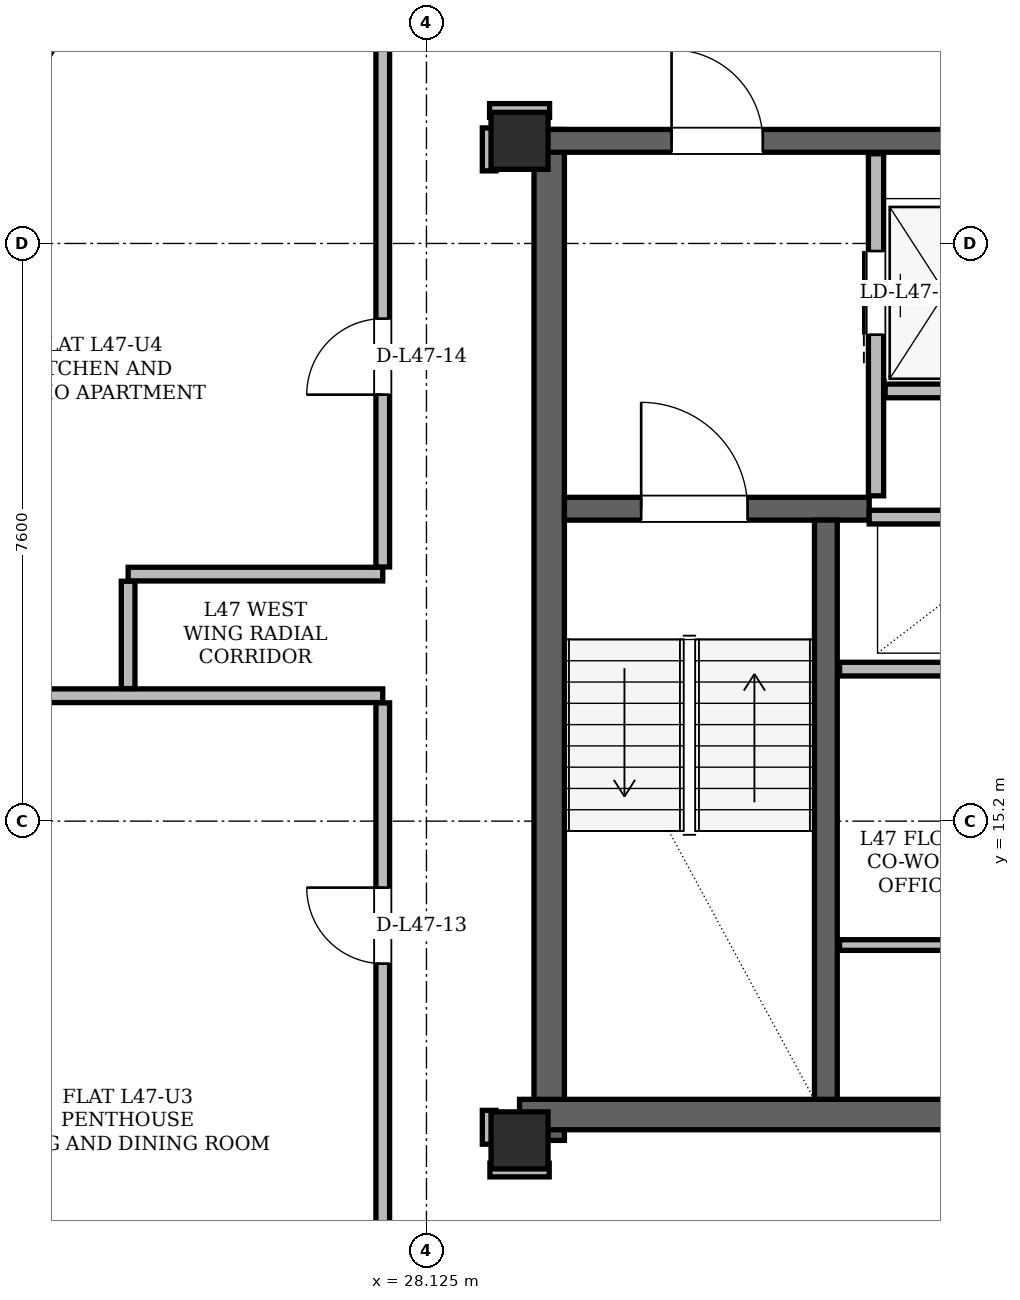
"""IFC4 building model, lengths in metres.
Left out: names, types, materials, properties, quantities, classifications, styles, units other than length and angle.
Written with IfcOpenShell. Run it as: python <this file> out.ifc"""

import sys

from ifc_helpers import new_model, si_unit, direction, frame, frame_2d, origin, origin_2d, place, context, subcontext, project, spatial, rectangle, hollow_rectangle, extrude, element, fill, save


model = new_model("IFC4")
c1 = context("Model", 3, precision=1e-05, world=origin(), true_north=direction((0.0, 1.0)))
c2 = subcontext(c1, "Body", "Model", "MODEL_VIEW")
j1 = project(units=[si_unit("LENGTHUNIT", "METRE"), si_unit("PLANEANGLEUNIT", "RADIAN")], contexts=[c1])
p1 = place(None, origin())
s1 = spatial("IfcSite", under=j1, at=p1, CompositionType="ELEMENT")
p2 = place(p1, origin())
s2 = spatial("IfcBuilding", under=s1, at=p2, CompositionType="ELEMENT")
p3 = place(p2, frame((0.0, 0.0, 178.2)))
s3 = spatial("IfcBuildingStorey", under=s2, at=p3, CompositionType="ELEMENT", Elevation=178.2)
for number, where, z_axis, x_axis in (
    (1, (29.35, 11.0, 0.0), (0.0, 0.0, 1.0), (1.0, 0.0, 0.0)),
    (2, (29.35, 24.15, 0.0), (0.0, 0.0, 1.0), (1.0, 0.0, 0.0)),
):
    element("IfcColumn", number, at=place(p3, frame(where, z_axis=z_axis, x_axis=x_axis)), inside=s3, PredefinedType="COLUMN", context=c2, shape_type="SweptSolid", body=[
        extrude(hollow_rectangle(XDim=0.75, YDim=0.75, WallThickness=0.06, at=origin_2d()), origin(), (0.0, 0.0, 1.0), 3.6),
    ])
p4 = place(p3, frame((29.74, 11.0, 0.0), z_axis=(0.0, 0.0, 1.0), x_axis=(0.0, 1.0, 0.0)))
e3 = element("IfcWall", 3, at=p4, inside=s3, PredefinedType="SHEAR", context=c2, shape_type="SweptSolid", body=[
    extrude(rectangle(XDim=13.3, YDim=0.4, at=frame_2d((6.65, 0.0))), origin(), (0.0, 0.0, 1.0), 3.38),
])
p5 = place(p3, frame((29.35, 11.34, 0.0), z_axis=(0.0, 0.0, 1.0), x_axis=(1.0, 0.0, 0.0)))
e4 = element("IfcWall", 4, at=p5, inside=s3, PredefinedType="SHEAR", context=c2, shape_type="SweptSolid", body=[
    extrude(rectangle(XDim=7.1, YDim=0.4, at=frame_2d((3.55, 0.0))), origin(), (0.0, 0.0, 1.0), 3.38),
])
p6 = place(p3, frame((29.65, 24.15, 0.0), z_axis=(0.0, 0.0, 1.0), x_axis=(1.0, 0.0, 0.0)))
e5 = element("IfcWall", 5, at=p6, inside=s3, PredefinedType="SHEAR", context=c2, shape_type="SweptSolid", body=[
    extrude(rectangle(XDim=15.7, YDim=0.3, at=frame_2d((7.85, 0.0))), origin(), (0.0, 0.0, 1.0), 3.38),
])
p7 = place(p6, frame((1.7, 0.0, 0.0)))
e6 = element("IfcOpeningElement", 6, at=p7, cuts=e5, PredefinedType="OPENING", context=c2, shape_type="SweptSolid", body=[
    extrude(rectangle(XDim=1.2, YDim=2.2, at=frame_2d((0.6, 1.1))), frame((0.0, 0.15, 0.0), z_axis=(0.0, -1.0, 0.0), x_axis=(1.0, 0.0, 0.0)), (0.0, 0.0, 1.0), 0.3),
])
p8 = place(p6, frame((12.8, 0.0, 0.0)))
e7 = element("IfcOpeningElement", 7, at=p8, cuts=e5, PredefinedType="OPENING", context=c2, shape_type="SweptSolid", body=[
    extrude(rectangle(XDim=1.2, YDim=2.2, at=frame_2d((0.6, 1.1))), frame((0.0, 0.15, 0.0), z_axis=(0.0, -1.0, 0.0), x_axis=(1.0, 0.0, 0.0)), (0.0, 0.0, 1.0), 0.3),
])
p9 = place(p6, frame((7.4, 0.0, 0.0)))
e8 = element("IfcOpeningElement", 8, at=p9, cuts=e5, PredefinedType="OPENING", context=c2, shape_type="SweptSolid", body=[
    extrude(rectangle(XDim=0.9, YDim=2.05, at=frame_2d((0.45, 1.025))), frame((0.0, 0.15, 0.0), z_axis=(0.0, -1.0, 0.0), x_axis=(1.0, 0.0, 0.0)), (0.0, 0.0, 1.0), 0.3),
])
p10 = place(p3, frame((29.94, 19.31, 0.0), z_axis=(0.0, 0.0, 1.0), x_axis=(1.0, 0.0, 0.0)))
e9 = element("IfcWall", 9, at=p10, inside=s3, PredefinedType="SHEAR", context=c2, shape_type="SweptSolid", body=[
    extrude(rectangle(XDim=4.01, YDim=0.3, at=frame_2d((2.005, 0.0))), origin(), (0.0, 0.0, 1.0), 3.38),
])
p11 = place(p10, frame((1.01, 0.0, 0.0)))
e10 = element("IfcOpeningElement", 10, at=p11, cuts=e9, PredefinedType="OPENING", context=c2, shape_type="SweptSolid", body=[
    extrude(rectangle(XDim=1.4, YDim=2.2, at=frame_2d((0.7, 1.1))), frame((0.0, 0.15, 0.0), z_axis=(0.0, -1.0, 0.0), x_axis=(1.0, 0.0, 0.0)), (0.0, 0.0, 1.0), 0.3),
])
p12 = place(p3, frame((33.38, 11.54, 0.0), z_axis=(0.0, 0.0, 1.0), x_axis=(0.0, 1.0, 0.0)))
e11 = element("IfcWall", 11, at=p12, inside=s3, PredefinedType="SHEAR", context=c2, shape_type="SweptSolid", body=[
    extrude(rectangle(XDim=7.62, YDim=0.3, at=frame_2d((3.81, 0.0))), origin(), (0.0, 0.0, 1.0), 3.38),
])
p13 = place(p3, frame((33.384, 43.257, 0.0), z_axis=(0.0, 0.0, 1.0), x_axis=(-0.499997641637, -0.866026765382, 0.0)))
e12 = element("IfcWall", 12, at=p13, inside=s3, PredefinedType="SOLIDWALL", context=c2, shape_type="SweptSolid", body=[
    extrude(rectangle(XDim=35.992, YDim=0.29, at=frame_2d((17.996, 0.0))), origin(), (0.0, 0.0, 1.0), 2.6),
])
p14 = place(p13, frame((8.034, 0.0, 0.0)))
e13 = element("IfcOpeningElement", 13, at=p14, cuts=e12, PredefinedType="OPENING", context=c2, shape_type="SweptSolid", body=[
    extrude(rectangle(XDim=1.5, YDim=2.2, at=frame_2d((0.75, 1.1))), frame((0.0, 0.145, 0.0), z_axis=(0.0, -1.0, 0.0), x_axis=(1.0, 0.0, 0.0)), (0.0, 0.0, 1.0), 0.29),
])
p15 = place(p13, frame((27.913, 0.0, 0.0)))
e14 = element("IfcOpeningElement", 14, at=p15, cuts=e12, PredefinedType="OPENING", context=c2, shape_type="SweptSolid", body=[
    extrude(rectangle(XDim=1.5, YDim=2.2, at=frame_2d((0.75, 1.1))), frame((0.0, 0.145, 0.0), z_axis=(0.0, -1.0, 0.0), x_axis=(1.0, 0.0, 0.0)), (0.0, 0.0, 1.0), 0.29),
])
p16 = place(p13, frame((33.875, 0.0, 0.85)))
e15 = element("IfcOpeningElement", 15, at=p16, cuts=e12, PredefinedType="OPENING", context=c2, shape_type="SweptSolid", body=[
    extrude(rectangle(XDim=1.2, YDim=1.48, at=frame_2d((0.6, 0.74))), frame((0.0, 0.145, 0.0), z_axis=(0.0, -1.0, 0.0), x_axis=(1.0, 0.0, 0.0)), (0.0, 0.0, 1.0), 0.29),
])
p17 = place(p13, frame((18.191, 0.0, 0.85)))
e16 = element("IfcOpeningElement", 16, at=p17, cuts=e12, PredefinedType="OPENING", context=c2, shape_type="SweptSolid", body=[
    extrude(rectangle(XDim=2.6, YDim=1.64, at=frame_2d((1.3, 0.82))), frame((0.0, 0.145, 0.0), z_axis=(0.0, -1.0, 0.0), x_axis=(1.0, 0.0, 0.0)), (0.0, 0.0, 1.0), 0.29),
])
p18 = place(p13, frame((26.178, 0.0, 0.85)))
e17 = element("IfcOpeningElement", 17, at=p18, cuts=e12, PredefinedType="OPENING", context=c2, shape_type="SweptSolid", body=[
    extrude(rectangle(XDim=1.2, YDim=1.48, at=frame_2d((0.6, 0.74))), frame((0.0, 0.145, 0.0), z_axis=(0.0, -1.0, 0.0), x_axis=(1.0, 0.0, 0.0)), (0.0, 0.0, 1.0), 0.29),
])
p19 = place(p13, frame((12.657, 0.0, 0.85)))
e18 = element("IfcOpeningElement", 18, at=p19, cuts=e12, PredefinedType="OPENING", context=c2, shape_type="SweptSolid", body=[
    extrude(rectangle(XDim=1.2, YDim=1.48, at=frame_2d((0.6, 0.74))), frame((0.0, 0.145, 0.0), z_axis=(0.0, -1.0, 0.0), x_axis=(1.0, 0.0, 0.0)), (0.0, 0.0, 1.0), 0.29),
])
p20 = place(p13, frame((14.939, 0.0, 0.85)))
e19 = element("IfcOpeningElement", 19, at=p20, cuts=e12, PredefinedType="OPENING", context=c2, shape_type="SweptSolid", body=[
    extrude(rectangle(XDim=1.8, YDim=1.64, at=frame_2d((0.9, 0.82))), frame((0.0, 0.145, 0.0), z_axis=(0.0, -1.0, 0.0), x_axis=(1.0, 0.0, 0.0)), (0.0, 0.0, 1.0), 0.29),
])
p21 = place(p13, frame((2.236, 0.0, 0.85)))
e20 = element("IfcOpeningElement", 20, at=p21, cuts=e12, PredefinedType="OPENING", context=c2, shape_type="SweptSolid", body=[
    extrude(rectangle(XDim=2.0, YDim=1.64, at=frame_2d((1.0, 0.82))), frame((0.0, 0.145, 0.0), z_axis=(0.0, -1.0, 0.0), x_axis=(1.0, 0.0, 0.0)), (0.0, 0.0, 1.0), 0.29),
])
p22 = place(p3, frame((34.04, 19.48, 0.0), z_axis=(0.0, 0.0, 1.0), x_axis=(0.0, 1.0, 0.0)))
e21 = element("IfcWall", 21, at=p22, inside=s3, PredefinedType="PARTITIONING", context=c2, shape_type="SweptSolid", body=[
    extrude(rectangle(XDim=4.5, YDim=0.2, at=frame_2d((2.25, 0.0))), origin(), (0.0, 0.0, 1.0), 3.38),
])
p23 = place(p22, frame((2.12, 0.0, 0.0)))
e22 = element("IfcOpeningElement", 22, at=p23, cuts=e21, PredefinedType="OPENING", context=c2, shape_type="SweptSolid", body=[
    extrude(rectangle(XDim=1.1, YDim=2.2, at=frame_2d((0.55, 1.1))), frame((0.0, 0.1, 0.0), z_axis=(0.0, -1.0, 0.0), x_axis=(1.0, 0.0, 0.0)), (0.0, 0.0, 1.0), 0.2),
])
p24 = place(p3, frame((34.16, 20.86, 0.0), z_axis=(0.0, 0.0, 1.0), x_axis=(1.0, 0.0, 0.0)))
e23 = element("IfcWall", 23, at=p24, inside=s3, PredefinedType="PARTITIONING", context=c2, shape_type="SweptSolid", body=[
    extrude(rectangle(XDim=1.58, YDim=0.18, at=frame_2d((0.79, 0.0))), origin(), (0.0, 0.0, 1.0), 3.38),
])
p25 = place(p3, frame((33.95, 19.2, 0.0), z_axis=(0.0, 0.0, 1.0), x_axis=(1.0, 0.0, 0.0)))
e24 = element("IfcWall", 24, at=p25, inside=s3, PredefinedType="PARTITIONING", context=c2, shape_type="SweptSolid", body=[
    extrude(rectangle(XDim=2.27, YDim=0.18, at=frame_2d((1.135, 0.0))), origin(), (0.0, 0.0, 1.0), 3.38),
])
p26 = place(p3, frame((33.56, 17.2, 0.0), z_axis=(0.0, 0.0, 1.0), x_axis=(1.0, 0.0, 0.0)))
e25 = element("IfcWall", 25, at=p26, inside=s3, PredefinedType="PARTITIONING", context=c2, shape_type="SweptSolid", body=[
    extrude(rectangle(XDim=2.66, YDim=0.18, at=frame_2d((1.33, 0.0))), origin(), (0.0, 0.0, 1.0), 3.38),
])
p27 = place(p3, frame((33.56, 13.57, 0.0), z_axis=(0.0, 0.0, 1.0), x_axis=(1.0, 0.0, 0.0)))
e26 = element("IfcWall", 26, at=p27, inside=s3, PredefinedType="PARTITIONING", context=c2, shape_type="SweptSolid", body=[
    extrude(rectangle(XDim=2.66, YDim=0.14, at=frame_2d((1.33, 0.0))), origin(), (0.0, 0.0, 1.0), 3.38),
])
p28 = place(p3, frame((28.96, 10.61, 0.0), z_axis=(0.0, 0.0, 1.0), x_axis=(1.0, 0.0, 0.0)))
e27 = element("IfcWall", 27, at=p28, inside=s3, PredefinedType="PARTITIONING", context=c2, shape_type="SweptSolid", body=[
    extrude(rectangle(XDim=0.78, YDim=0.18, at=frame_2d((0.39, 0.0))), origin(), (0.0, 0.0, 1.0), 3.38),
])
p29 = place(p3, frame((18.501, 16.85, 0.0), z_axis=(0.0, 0.0, 1.0), x_axis=(1.0, 0.0, 0.0)))
e28 = element("IfcWall", 28, at=p29, inside=s3, PredefinedType="PARTITIONING", context=c2, shape_type="SweptSolid", body=[
    extrude(rectangle(XDim=9.049, YDim=0.18, at=frame_2d((4.524, 0.0))), origin(), (0.0, 0.0, 1.0), 3.38),
])
p30 = place(p3, frame((24.2, 18.45, 0.0), z_axis=(0.0, 0.0, 1.0), x_axis=(1.0, 0.0, 0.0)))
e29 = element("IfcWall", 29, at=p30, inside=s3, PredefinedType="PARTITIONING", context=c2, shape_type="SweptSolid", body=[
    extrude(rectangle(XDim=3.35, YDim=0.18, at=frame_2d((1.675, 0.0))), origin(), (0.0, 0.0, 1.0), 3.38),
])
p31 = place(p3, frame((28.955, 24.55, 0.0), z_axis=(0.0, 0.0, 1.0), x_axis=(1.0, 0.0, 0.0)))
e30 = element("IfcWall", 30, at=p31, inside=s3, PredefinedType="PARTITIONING", context=c2, shape_type="SweptSolid", body=[
    extrude(rectangle(XDim=0.79, YDim=0.18, at=frame_2d((0.395, 0.0))), origin(), (0.0, 0.0, 1.0), 2.842),
])
p32 = place(p3, frame((24.2, 16.944, 0.0), z_axis=(0.0, 0.0, 1.0), x_axis=(0.0, 1.0, 0.0)))
e31 = element("IfcWall", 31, at=p32, inside=s3, PredefinedType="PARTITIONING", context=c2, shape_type="SweptSolid", body=[
    extrude(rectangle(XDim=1.412, YDim=0.18, at=frame_2d((0.706, 0.0))), origin(), (0.0, 0.0, 1.0), 3.38),
])
p33 = place(p3, frame((27.55, 5.106, 0.0), z_axis=(0.0, 0.0, 1.0), x_axis=(0.0, 1.0, 0.0)))
e32 = element("IfcWall", 32, at=p33, inside=s3, PredefinedType="PARTITIONING", context=c2, shape_type="SweptSolid", body=[
    extrude(rectangle(XDim=11.65, YDim=0.18, at=frame_2d((5.825, 0.0))), origin(), (0.0, 0.0, 1.0), 2.842),
])
p34 = place(p33, frame((8.22, 0.0, 0.0)))
e33 = element("IfcOpeningElement", 33, at=p34, cuts=e32, PredefinedType="OPENING", context=c2, shape_type="SweptSolid", body=[
    extrude(rectangle(XDim=1.0, YDim=2.18, at=frame_2d((0.5, 1.09))), frame((0.0, 0.09, 0.0), z_axis=(0.0, -1.0, 0.0), x_axis=(1.0, 0.0, 0.0)), (0.0, 0.0, 1.0), 0.18),
])
p35 = place(p3, frame((27.55, 18.544, 0.0), z_axis=(0.0, 0.0, 1.0), x_axis=(0.0, 1.0, 0.0)))
e34 = element("IfcWall", 34, at=p35, inside=s3, PredefinedType="PARTITIONING", context=c2, shape_type="SweptSolid", body=[
    extrude(rectangle(XDim=14.311, YDim=0.18, at=frame_2d((7.155, 0.0))), origin(), (0.0, 0.0, 1.0), 3.38),
])
p36 = place(p35, frame((2.267, 0.0, 0.0)))
e35 = element("IfcOpeningElement", 35, at=p36, cuts=e34, PredefinedType="OPENING", context=c2, shape_type="SweptSolid", body=[
    extrude(rectangle(XDim=1.0, YDim=2.18, at=frame_2d((0.5, 1.09))), frame((0.0, 0.09, 0.0), z_axis=(0.0, -1.0, 0.0), x_axis=(1.0, 0.0, 0.0)), (0.0, 0.0, 1.0), 0.18),
])
p37 = place(p3, frame((28.95, 10.95, 0.0), z_axis=(0.0, 0.0, 1.0), x_axis=(0.0, 1.0, 0.0)))
e36 = element("IfcWall", 36, at=p37, inside=s3, PredefinedType="PARTITIONING", context=c2, shape_type="SweptSolid", body=[
    extrude(rectangle(XDim=0.445, YDim=0.18, at=frame_2d((0.223, 0.0))), origin(), (0.0, 0.0, 1.0), 2.842),
])
p38 = place(p3, frame((28.95, 23.755, 0.0), z_axis=(0.0, 0.0, 1.0), x_axis=(0.0, 1.0, 0.0)))
e37 = element("IfcWall", 37, at=p38, inside=s3, PredefinedType="PARTITIONING", context=c2, shape_type="SweptSolid", body=[
    extrude(rectangle(XDim=0.565, YDim=0.18, at=frame_2d((0.283, 0.0))), origin(), (0.0, 0.0, 1.0), 3.38),
])
p39 = place(p17, origin())
e38 = element("IfcWindow", 38, at=p39, inside=s3, PartitioningType="SINGLE_PANEL", PredefinedType="WINDOW", context=c2, shape_type="SweptSolid", body=[
    extrude(rectangle(XDim=2.6, YDim=1.64, at=frame_2d((1.3, 0.82))), frame((0.0, 0.03, 0.0), z_axis=(0.0, -1.0, 0.0), x_axis=(1.0, 0.0, 0.0)), (0.0, 0.0, 1.0), 0.06),
])
fill(e16, e38)
p40 = place(p23, origin())
e39 = element("IfcDoor", 39, at=p40, inside=s3, OperationType="SLIDING_TO_LEFT", PredefinedType="DOOR", context=c2, shape_type="SweptSolid", body=[
    extrude(rectangle(XDim=1.1, YDim=2.2, at=frame_2d((0.55, 1.1))), frame((0.0, 0.025, 0.0), z_axis=(0.0, -1.0, 0.0), x_axis=(1.0, 0.0, 0.0)), (0.0, 0.0, 1.0), 0.05),
])
fill(e22, e39)
p41 = place(p11, origin())
e40 = element("IfcDoor", 40, at=p41, inside=s3, OperationType="SINGLE_SWING_LEFT", PredefinedType="DOOR", context=c2, shape_type="SweptSolid", body=[
    extrude(rectangle(XDim=1.4, YDim=2.2, at=frame_2d((0.7, 1.1))), frame((0.0, 0.025, 0.0), z_axis=(0.0, -1.0, 0.0), x_axis=(1.0, 0.0, 0.0)), (0.0, 0.0, 1.0), 0.05),
])
fill(e10, e40)
p42 = place(p7, origin())
e41 = element("IfcDoor", 41, at=p42, inside=s3, OperationType="SINGLE_SWING_LEFT", PredefinedType="DOOR", context=c2, shape_type="SweptSolid", body=[
    extrude(rectangle(XDim=1.2, YDim=2.2, at=frame_2d((0.6, 1.1))), frame((0.0, 0.025, 0.0), z_axis=(0.0, -1.0, 0.0), x_axis=(1.0, 0.0, 0.0)), (0.0, 0.0, 1.0), 0.05),
])
fill(e6, e41)
p43 = place(p34, origin())
e42 = element("IfcDoor", 42, at=p43, inside=s3, OperationType="SINGLE_SWING_RIGHT", PredefinedType="DOOR", context=c2, shape_type="SweptSolid", body=[
    extrude(rectangle(XDim=1.0, YDim=2.18, at=frame_2d((0.5, 1.09))), frame((0.0, 0.025, 0.0), z_axis=(0.0, -1.0, 0.0), x_axis=(1.0, 0.0, 0.0)), (0.0, 0.0, 1.0), 0.05),
])
fill(e33, e42)
p44 = place(p36, origin())
e43 = element("IfcDoor", 43, at=p44, inside=s3, OperationType="SINGLE_SWING_LEFT", PredefinedType="DOOR", context=c2, shape_type="SweptSolid", body=[
    extrude(rectangle(XDim=1.0, YDim=2.18, at=frame_2d((0.5, 1.09))), frame((0.0, 0.025, 0.0), z_axis=(0.0, -1.0, 0.0), x_axis=(1.0, 0.0, 0.0)), (0.0, 0.0, 1.0), 0.05),
])
fill(e35, e43)
save(model, sys.argv[1])
